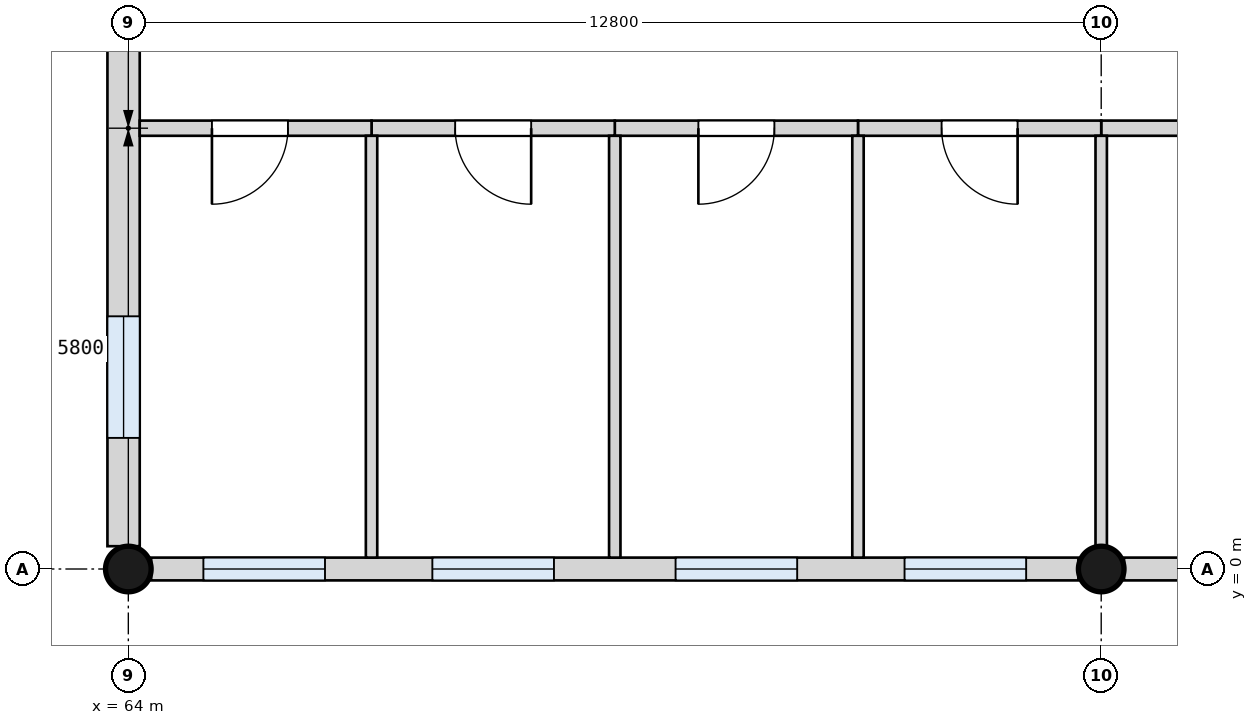
"""IFC4 building model, lengths in metres.
Left out: names, types, materials, properties, quantities, classifications, styles, units other than length and angle.
Written with IfcOpenShell. Run it as: python <this file> out.ifc"""

import sys

from ifc_helpers import new_model, si_unit, direction, frame, frame_2d, origin, origin_2d, place, context, subcontext, project, spatial, rectangle, circle, extrude, element, fill, save


model = new_model("IFC4")
c1 = context("Model", 3, precision=1e-05, world=origin(), true_north=direction((0.0, 1.0)))
c2 = subcontext(c1, "Body", "Model", "MODEL_VIEW")
j1 = project(units=[si_unit("LENGTHUNIT", "METRE"), si_unit("PLANEANGLEUNIT", "RADIAN")], contexts=[c1])
p1 = place(None, origin())
s1 = spatial("IfcSite", under=j1, at=p1, CompositionType="ELEMENT")
p2 = place(p1, origin())
s2 = spatial("IfcBuilding", under=s1, at=p2, CompositionType="ELEMENT")
p3 = place(p2, frame((0.0, 0.0, 4.2)))
s3 = spatial("IfcBuildingStorey", under=s2, at=p3, CompositionType="ELEMENT", Elevation=4.2)
for number, where, z_axis, x_axis in (
    (1, (76.8, 0.0, 0.0), (0.0, 0.0, 1.0), (1.0, 0.0, 0.0)),
    (2, (64.0, 0.0, 0.0), (0.0, 0.0, 1.0), (1.0, 0.0, 0.0)),
):
    element("IfcColumn", number, at=place(p3, frame(where, z_axis=z_axis, x_axis=x_axis)), inside=s3, PredefinedType="COLUMN", context=c2, shape_type="SweptSolid", body=[
        extrude(circle(Radius=0.3, at=origin_2d()), origin(), (0.0, 0.0, 1.0), 4.2),
    ])
p4 = place(p3, frame((53.4, 4.8, 0.0), z_axis=(0.0, 0.0, 1.0), x_axis=(1.0, 0.0, 0.0)))
e3 = element("IfcWall", 3, at=p4, inside=s3, PredefinedType="SHEAR", context=c2, shape_type="SweptSolid", body=[
    extrude(rectangle(XDim=10.325, YDim=0.4, at=frame_2d((5.163, 0.0))), origin(), (0.0, 0.0, 1.0), 4.2),
])
p5 = place(p4, frame((1.65, 0.0, 1.1)))
e4 = element("IfcOpeningElement", 4, at=p5, cuts=e3, PredefinedType="OPENING", context=c2, shape_type="SweptSolid", body=[
    extrude(rectangle(XDim=1.2, YDim=1.5, at=frame_2d((0.6, 0.75))), frame((0.0, 0.21, 0.0), z_axis=(0.0, -1.0, 0.0), x_axis=(1.0, 0.0, 0.0)), (0.0, 0.0, 1.0), 0.42),
])
p6 = place(p4, frame((7.15, 0.0, 1.1)))
e5 = element("IfcOpeningElement", 5, at=p6, cuts=e3, PredefinedType="OPENING", context=c2, shape_type="SweptSolid", body=[
    extrude(rectangle(XDim=1.2, YDim=1.5, at=frame_2d((0.6, 0.75))), frame((0.0, 0.21, 0.0), z_axis=(0.0, -1.0, 0.0), x_axis=(1.0, 0.0, 0.0)), (0.0, 0.0, 1.0), 0.42),
])
p7 = place(p3, frame((63.2, 5.0, 0.0), z_axis=(0.0, 0.0, 1.0), x_axis=(0.0, 1.0, 0.0)))
e6 = element("IfcWall", 6, at=p7, inside=s3, PredefinedType="SHEAR", context=c2, shape_type="SweptSolid", body=[
    extrude(rectangle(XDim=9.2, YDim=0.4, at=frame_2d((4.6, 0.0))), origin(), (0.0, 0.0, 1.0), 4.2),
])
p8 = place(p3, frame((64.3, 0.0, 0.0), z_axis=(0.0, 0.0, 1.0), x_axis=(1.0, 0.0, 0.0)))
e7 = element("IfcWall", 7, at=p8, inside=s3, PredefinedType="SOLIDWALL", context=c2, shape_type="SweptSolid", body=[
    extrude(rectangle(XDim=12.2, YDim=0.3, at=frame_2d((6.1, 0.0))), origin(), (0.0, 0.0, 1.0), 3.0),
])
p9 = place(p8, frame((9.913, 0.0, 1.0)))
e8 = element("IfcOpeningElement", 8, at=p9, cuts=e7, PredefinedType="OPENING", context=c2, shape_type="SweptSolid", body=[
    extrude(rectangle(XDim=1.6, YDim=1.8, at=frame_2d((0.8, 0.9))), frame((0.0, 0.16, 0.0), z_axis=(0.0, -1.0, 0.0), x_axis=(1.0, 0.0, 0.0)), (0.0, 0.0, 1.0), 0.32),
])
p10 = place(p8, frame((6.9, 0.0, 1.0)))
e9 = element("IfcOpeningElement", 9, at=p10, cuts=e7, PredefinedType="OPENING", context=c2, shape_type="SweptSolid", body=[
    extrude(rectangle(XDim=1.6, YDim=1.8, at=frame_2d((0.8, 0.9))), frame((0.0, 0.16, 0.0), z_axis=(0.0, -1.0, 0.0), x_axis=(1.0, 0.0, 0.0)), (0.0, 0.0, 1.0), 0.32),
])
p11 = place(p8, frame((3.7, 0.0, 1.0)))
e10 = element("IfcOpeningElement", 10, at=p11, cuts=e7, PredefinedType="OPENING", context=c2, shape_type="SweptSolid", body=[
    extrude(rectangle(XDim=1.6, YDim=1.8, at=frame_2d((0.8, 0.9))), frame((0.0, 0.16, 0.0), z_axis=(0.0, -1.0, 0.0), x_axis=(1.0, 0.0, 0.0)), (0.0, 0.0, 1.0), 0.32),
])
p12 = place(p8, frame((0.688, 0.0, 1.0)))
e11 = element("IfcOpeningElement", 11, at=p12, cuts=e7, PredefinedType="OPENING", context=c2, shape_type="SweptSolid", body=[
    extrude(rectangle(XDim=1.6, YDim=1.8, at=frame_2d((0.8, 0.9))), frame((0.0, 0.16, 0.0), z_axis=(0.0, -1.0, 0.0), x_axis=(1.0, 0.0, 0.0)), (0.0, 0.0, 1.0), 0.32),
])
p13 = place(p3, frame((77.1, 0.0, 0.0), z_axis=(0.0, 0.0, 1.0), x_axis=(1.0, 0.0, 0.0)))
e12 = element("IfcWall", 12, at=p13, inside=s3, PredefinedType="SOLIDWALL", context=c2, shape_type="SweptSolid", body=[
    extrude(rectangle(XDim=7.9, YDim=0.3, at=frame_2d((3.95, 0.0))), origin(), (0.0, 0.0, 1.0), 3.0),
])
p14 = place(p13, frame((3.575, 0.0, 1.0)))
e13 = element("IfcOpeningElement", 13, at=p14, cuts=e12, PredefinedType="OPENING", context=c2, shape_type="SweptSolid", body=[
    extrude(rectangle(XDim=1.6, YDim=1.8, at=frame_2d((0.8, 0.9))), frame((0.0, 0.16, 0.0), z_axis=(0.0, -1.0, 0.0), x_axis=(1.0, 0.0, 0.0)), (0.0, 0.0, 1.0), 0.32),
])
p15 = place(p13, frame((0.8, 0.0, 1.0)))
e14 = element("IfcOpeningElement", 14, at=p15, cuts=e12, PredefinedType="OPENING", context=c2, shape_type="SweptSolid", body=[
    extrude(rectangle(XDim=1.6, YDim=1.8, at=frame_2d((0.8, 0.9))), frame((0.0, 0.16, 0.0), z_axis=(0.0, -1.0, 0.0), x_axis=(1.0, 0.0, 0.0)), (0.0, 0.0, 1.0), 0.32),
])
p16 = place(p3, frame((63.938, 0.3, 0.0), z_axis=(0.0, 0.0, 1.0), x_axis=(0.0, 1.0, 0.0)))
e15 = element("IfcWall", 15, at=p16, inside=s3, PredefinedType="SOLIDWALL", context=c2, shape_type="SweptSolid", body=[
    extrude(rectangle(XDim=13.8, YDim=0.425, at=frame_2d((6.9, 0.0))), origin(), (0.0, 0.0, 1.0), 2.9),
])
p17 = place(p16, frame((1.425, 0.0, 1.0)))
e16 = element("IfcOpeningElement", 16, at=p17, cuts=e15, PredefinedType="OPENING", context=c2, shape_type="SweptSolid", body=[
    extrude(rectangle(XDim=1.6, YDim=1.8, at=frame_2d((0.8, 0.9))), frame((0.0, 0.222, 0.0), z_axis=(0.0, -1.0, 0.0), x_axis=(1.0, 0.0, 0.0)), (0.0, 0.0, 1.0), 0.445),
])
p18 = place(p16, frame((10.025, 0.0, 1.0)))
e17 = element("IfcOpeningElement", 17, at=p18, cuts=e15, PredefinedType="OPENING", context=c2, shape_type="SweptSolid", body=[
    extrude(rectangle(XDim=1.6, YDim=1.8, at=frame_2d((0.8, 0.9))), frame((0.0, 0.222, 0.0), z_axis=(0.0, -1.0, 0.0), x_axis=(1.0, 0.0, 0.0)), (0.0, 0.0, 1.0), 0.445),
])
p19 = place(p3, frame((80.0, 5.8, 0.0), z_axis=(0.0, 0.0, 1.0), x_axis=(-1.0, 0.0, 0.0)))
e18 = element("IfcWall", 18, at=p19, inside=s3, PredefinedType="PARTITIONING", context=c2, shape_type="SweptSolid", body=[
    extrude(rectangle(XDim=3.2, YDim=0.2, at=frame_2d((1.6, 0.0))), origin(), (0.0, 0.0, 1.0), 3.9),
])
p20 = place(p19, frame((1.1, 0.0, 0.0)))
e19 = element("IfcOpeningElement", 19, at=p20, cuts=e18, PredefinedType="OPENING", context=c2, shape_type="SweptSolid", body=[
    extrude(rectangle(XDim=1.0, YDim=2.1, at=frame_2d((0.5, 1.05))), frame((0.0, 0.11, 0.0), z_axis=(0.0, -1.0, 0.0), x_axis=(1.0, 0.0, 0.0)), (0.0, 0.0, 1.0), 0.22),
])
p21 = place(p3, frame((76.8, 5.8, 0.0), z_axis=(0.0, 0.0, 1.0), x_axis=(-1.0, 0.0, 0.0)))
e20 = element("IfcWall", 20, at=p21, inside=s3, PredefinedType="PARTITIONING", context=c2, shape_type="SweptSolid", body=[
    extrude(rectangle(XDim=3.2, YDim=0.2, at=frame_2d((1.6, 0.0))), origin(), (0.0, 0.0, 1.0), 3.9),
])
p22 = place(p21, frame((1.1, 0.0, 0.0)))
e21 = element("IfcOpeningElement", 21, at=p22, cuts=e20, PredefinedType="OPENING", context=c2, shape_type="SweptSolid", body=[
    extrude(rectangle(XDim=1.0, YDim=2.1, at=frame_2d((0.5, 1.05))), frame((0.0, 0.11, 0.0), z_axis=(0.0, -1.0, 0.0), x_axis=(1.0, 0.0, 0.0)), (0.0, 0.0, 1.0), 0.22),
])
p23 = place(p3, frame((73.6, 5.8, 0.0), z_axis=(0.0, 0.0, 1.0), x_axis=(-1.0, 0.0, 0.0)))
e22 = element("IfcWall", 22, at=p23, inside=s3, PredefinedType="PARTITIONING", context=c2, shape_type="SweptSolid", body=[
    extrude(rectangle(XDim=3.2, YDim=0.2, at=frame_2d((1.6, 0.0))), origin(), (0.0, 0.0, 1.0), 3.9),
])
p24 = place(p23, frame((1.1, 0.0, 0.0)))
e23 = element("IfcOpeningElement", 23, at=p24, cuts=e22, PredefinedType="OPENING", context=c2, shape_type="SweptSolid", body=[
    extrude(rectangle(XDim=1.0, YDim=2.1, at=frame_2d((0.5, 1.05))), frame((0.0, 0.11, 0.0), z_axis=(0.0, -1.0, 0.0), x_axis=(1.0, 0.0, 0.0)), (0.0, 0.0, 1.0), 0.22),
])
p25 = place(p3, frame((70.4, 5.8, 0.0), z_axis=(0.0, 0.0, 1.0), x_axis=(-1.0, 0.0, 0.0)))
e24 = element("IfcWall", 24, at=p25, inside=s3, PredefinedType="PARTITIONING", context=c2, shape_type="SweptSolid", body=[
    extrude(rectangle(XDim=3.2, YDim=0.2, at=frame_2d((1.6, 0.0))), origin(), (0.0, 0.0, 1.0), 3.9),
])
p26 = place(p25, frame((1.1, 0.0, 0.0)))
e25 = element("IfcOpeningElement", 25, at=p26, cuts=e24, PredefinedType="OPENING", context=c2, shape_type="SweptSolid", body=[
    extrude(rectangle(XDim=1.0, YDim=2.1, at=frame_2d((0.5, 1.05))), frame((0.0, 0.11, 0.0), z_axis=(0.0, -1.0, 0.0), x_axis=(1.0, 0.0, 0.0)), (0.0, 0.0, 1.0), 0.22),
])
p27 = place(p3, frame((67.2, 5.8, 0.0), z_axis=(0.0, 0.0, 1.0), x_axis=(-1.0, 0.0, 0.0)))
e26 = element("IfcWall", 26, at=p27, inside=s3, PredefinedType="PARTITIONING", context=c2, shape_type="SweptSolid", body=[
    extrude(rectangle(XDim=3.05, YDim=0.2, at=frame_2d((1.525, 0.0))), origin(), (0.0, 0.0, 1.0), 3.9),
])
p28 = place(p27, frame((1.1, 0.0, 0.0)))
e27 = element("IfcOpeningElement", 27, at=p28, cuts=e26, PredefinedType="OPENING", context=c2, shape_type="SweptSolid", body=[
    extrude(rectangle(XDim=1.0, YDim=2.1, at=frame_2d((0.5, 1.05))), frame((0.0, 0.11, 0.0), z_axis=(0.0, -1.0, 0.0), x_axis=(1.0, 0.0, 0.0)), (0.0, 0.0, 1.0), 0.22),
])
p29 = place(p3, frame((76.8, 0.27, 0.0), z_axis=(0.0, 0.0, 1.0), x_axis=(0.0, 1.0, 0.0)))
e28 = element("IfcWall", 28, at=p29, inside=s3, PredefinedType="PARTITIONING", context=c2, shape_type="SweptSolid", body=[
    extrude(rectangle(XDim=5.43, YDim=0.15, at=frame_2d((2.715, 0.0))), origin(), (0.0, 0.0, 1.0), 2.9),
])
p30 = place(p3, frame((73.6, 0.15, 0.0), z_axis=(0.0, 0.0, 1.0), x_axis=(0.0, 1.0, 0.0)))
e29 = element("IfcWall", 29, at=p30, inside=s3, PredefinedType="PARTITIONING", context=c2, shape_type="SweptSolid", body=[
    extrude(rectangle(XDim=5.55, YDim=0.15, at=frame_2d((2.775, 0.0))), origin(), (0.0, 0.0, 1.0), 3.0),
])
p31 = place(p3, frame((70.4, 0.15, 0.0), z_axis=(0.0, 0.0, 1.0), x_axis=(0.0, 1.0, 0.0)))
e30 = element("IfcWall", 30, at=p31, inside=s3, PredefinedType="PARTITIONING", context=c2, shape_type="SweptSolid", body=[
    extrude(rectangle(XDim=5.55, YDim=0.15, at=frame_2d((2.775, 0.0))), origin(), (0.0, 0.0, 1.0), 2.9),
])
p32 = place(p3, frame((67.2, 0.15, 0.0), z_axis=(0.0, 0.0, 1.0), x_axis=(0.0, 1.0, 0.0)))
e31 = element("IfcWall", 31, at=p32, inside=s3, PredefinedType="PARTITIONING", context=c2, shape_type="SweptSolid", body=[
    extrude(rectangle(XDim=5.55, YDim=0.15, at=frame_2d((2.775, 0.0))), origin(), (0.0, 0.0, 1.0), 3.0),
])
p33 = place(p22, origin())
e32 = element("IfcDoor", 32, at=p33, inside=s3, OperationType="SINGLE_SWING_LEFT", PredefinedType="DOOR", context=c2, shape_type="SweptSolid", body=[
    extrude(rectangle(XDim=1.0, YDim=2.1, at=frame_2d((0.5, 1.05))), frame((0.0, 0.025, 0.0), z_axis=(0.0, -1.0, 0.0), x_axis=(1.0, 0.0, 0.0)), (0.0, 0.0, 1.0), 0.05),
])
fill(e21, e32)
p34 = place(p24, origin())
e33 = element("IfcDoor", 33, at=p34, inside=s3, OperationType="SINGLE_SWING_RIGHT", PredefinedType="DOOR", context=c2, shape_type="SweptSolid", body=[
    extrude(rectangle(XDim=1.0, YDim=2.1, at=frame_2d((0.5, 1.05))), frame((0.0, 0.025, 0.0), z_axis=(0.0, -1.0, 0.0), x_axis=(1.0, 0.0, 0.0)), (0.0, 0.0, 1.0), 0.05),
])
fill(e23, e33)
p35 = place(p26, origin())
e34 = element("IfcDoor", 34, at=p35, inside=s3, OperationType="SINGLE_SWING_LEFT", PredefinedType="DOOR", context=c2, shape_type="SweptSolid", body=[
    extrude(rectangle(XDim=1.0, YDim=2.1, at=frame_2d((0.5, 1.05))), frame((0.0, 0.025, 0.0), z_axis=(0.0, -1.0, 0.0), x_axis=(1.0, 0.0, 0.0)), (0.0, 0.0, 1.0), 0.05),
])
fill(e25, e34)
p36 = place(p28, origin())
e35 = element("IfcDoor", 35, at=p36, inside=s3, OperationType="SINGLE_SWING_RIGHT", PredefinedType="DOOR", context=c2, shape_type="SweptSolid", body=[
    extrude(rectangle(XDim=1.0, YDim=2.1, at=frame_2d((0.5, 1.05))), frame((0.0, 0.025, 0.0), z_axis=(0.0, -1.0, 0.0), x_axis=(1.0, 0.0, 0.0)), (0.0, 0.0, 1.0), 0.05),
])
fill(e27, e35)
p37 = place(p9, origin())
e36 = element("IfcWindow", 36, at=p37, inside=s3, PartitioningType="SINGLE_PANEL", PredefinedType="WINDOW", context=c2, shape_type="SweptSolid", body=[
    extrude(rectangle(XDim=1.6, YDim=1.8, at=frame_2d((0.8, 0.9))), frame((0.0, 0.03, 0.0), z_axis=(0.0, -1.0, 0.0), x_axis=(1.0, 0.0, 0.0)), (0.0, 0.0, 1.0), 0.06),
])
fill(e8, e36)
p38 = place(p10, origin())
e37 = element("IfcWindow", 37, at=p38, inside=s3, PartitioningType="SINGLE_PANEL", PredefinedType="WINDOW", context=c2, shape_type="SweptSolid", body=[
    extrude(rectangle(XDim=1.6, YDim=1.8, at=frame_2d((0.8, 0.9))), frame((0.0, 0.03, 0.0), z_axis=(0.0, -1.0, 0.0), x_axis=(1.0, 0.0, 0.0)), (0.0, 0.0, 1.0), 0.06),
])
fill(e9, e37)
p39 = place(p11, origin())
e38 = element("IfcWindow", 38, at=p39, inside=s3, PartitioningType="SINGLE_PANEL", PredefinedType="WINDOW", context=c2, shape_type="SweptSolid", body=[
    extrude(rectangle(XDim=1.6, YDim=1.8, at=frame_2d((0.8, 0.9))), frame((0.0, 0.03, 0.0), z_axis=(0.0, -1.0, 0.0), x_axis=(1.0, 0.0, 0.0)), (0.0, 0.0, 1.0), 0.06),
])
fill(e10, e38)
p40 = place(p12, origin())
e39 = element("IfcWindow", 39, at=p40, inside=s3, PartitioningType="SINGLE_PANEL", PredefinedType="WINDOW", context=c2, shape_type="SweptSolid", body=[
    extrude(rectangle(XDim=1.6, YDim=1.8, at=frame_2d((0.8, 0.9))), frame((0.0, 0.03, 0.0), z_axis=(0.0, -1.0, 0.0), x_axis=(1.0, 0.0, 0.0)), (0.0, 0.0, 1.0), 0.06),
])
fill(e11, e39)
p41 = place(p17, origin())
e40 = element("IfcWindow", 40, at=p41, inside=s3, PartitioningType="SINGLE_PANEL", PredefinedType="WINDOW", context=c2, shape_type="SweptSolid", body=[
    extrude(rectangle(XDim=1.6, YDim=1.8, at=frame_2d((0.8, 0.9))), frame((0.0, 0.03, 0.0), z_axis=(0.0, -1.0, 0.0), x_axis=(1.0, 0.0, 0.0)), (0.0, 0.0, 1.0), 0.06),
])
fill(e16, e40)
save(model, sys.argv[1])
